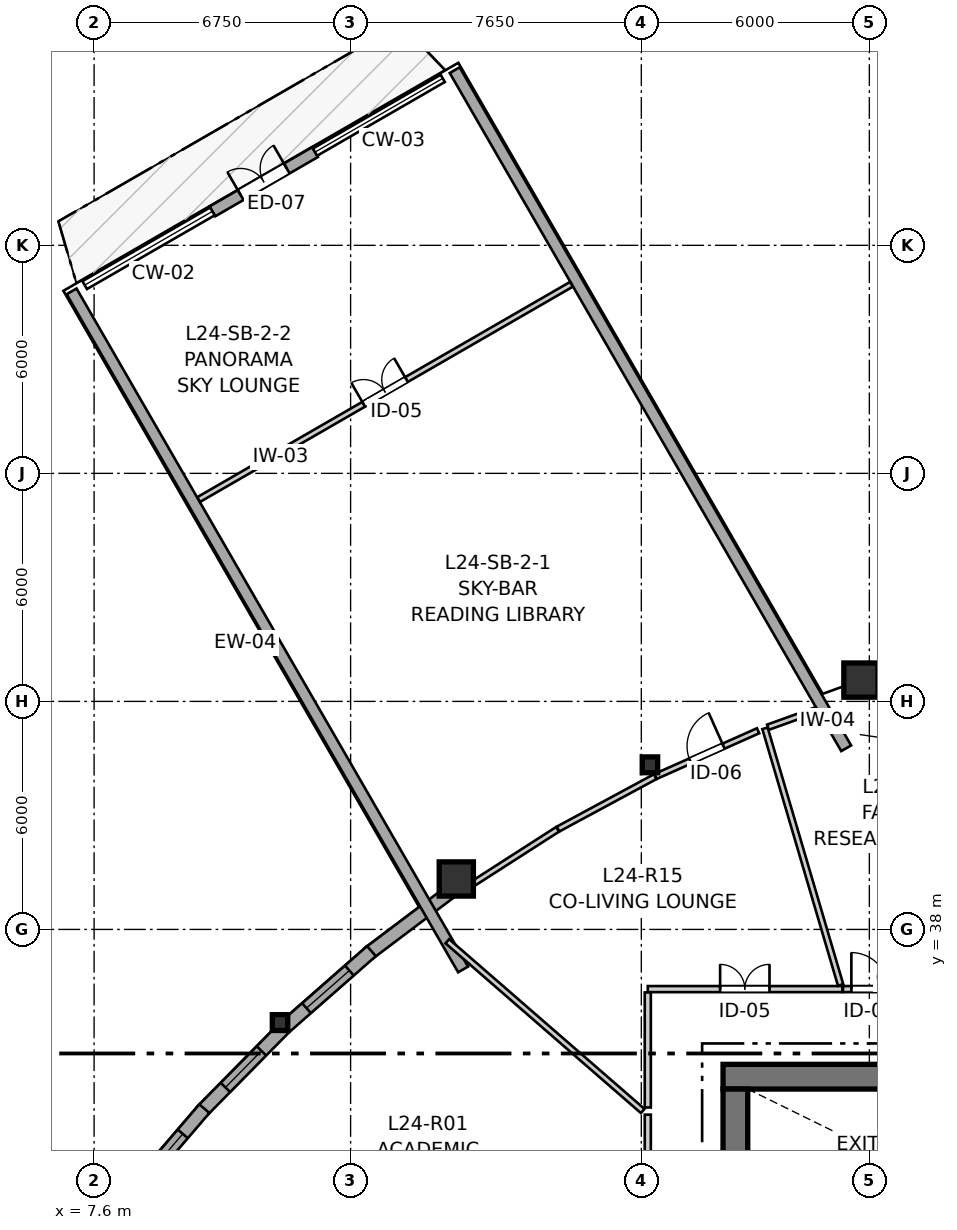
"""IFC4 building model, lengths in metres.
Left out: names, types, materials, properties, quantities, classifications, styles, units other than length and angle.
Written with IfcOpenShell. Run it as: python <this file> out.ifc"""

import sys

from ifc_helpers import new_model, si_unit, direction, frame, frame_2d, origin, origin_2d, place, context, subcontext, project, spatial, rectangle, i_section, extrude, source, transform, mapped, element, fill, save


model = new_model("IFC4")
c1 = context("Model", 3, precision=1e-05, world=origin(), true_north=direction((0.0, 1.0)))
c2 = subcontext(c1, "Body", "Model", "MODEL_VIEW")
j1 = project(units=[si_unit("LENGTHUNIT", "METRE"), si_unit("PLANEANGLEUNIT", "RADIAN")], contexts=[c1])
p1 = place(None, origin())
s1 = spatial("IfcSite", under=j1, at=p1, CompositionType="ELEMENT")
p2 = place(p1, origin())
s2 = spatial("IfcBuilding", under=s1, at=p2, CompositionType="ELEMENT")
p3 = place(p2, frame((0.0, 0.0, 83.2)))
s3 = spatial("IfcBuildingStorey", under=s2, at=p3, CompositionType="ELEMENT", Elevation=83.2)
p4 = place(p3, frame((36.55, 34.125, 0.0), z_axis=(0.0, 0.0, 1.0), x_axis=(-1.0, 0.0, 0.0)))
e1 = element("IfcWall", 1, at=p4, inside=s3, PredefinedType="SHEAR", context=c2, shape_type="SweptSolid", body=[
    extrude(rectangle(XDim=12.4, YDim=0.65, at=frame_2d((6.2, 0.0))), origin(), (0.0, 0.0, 1.0), 2.935),
])
p5 = place(p3, frame((24.475, 33.8, 0.0), z_axis=(0.0, 0.0, 1.0), x_axis=(0.0, -1.0, 0.0)))
e2 = element("IfcWall", 2, at=p5, inside=s3, PredefinedType="SHEAR", context=c2, shape_type="SweptSolid", body=[
    extrude(rectangle(XDim=15.6, YDim=0.65, at=frame_2d((7.8, 0.0))), origin(), (0.0, 0.0, 1.0), 2.935),
])
p6 = place(p5, frame((7.05, 0.0, 0.0)))
e3 = element("IfcOpeningElement", 3, at=p6, cuts=e2, PredefinedType="OPENING", context=c2, shape_type="SweptSolid", body=[
    extrude(rectangle(XDim=1.5, YDim=2.15, at=frame_2d((0.75, 1.075))), frame((0.0, 0.335, 0.0), z_axis=(0.0, -1.0, 0.0), x_axis=(1.0, 0.0, 0.0)), (0.0, 0.0, 1.0), 0.67),
])
p7 = place(p5, frame((3.52, 0.0, 0.0)))
e4 = element("IfcOpeningElement", 4, at=p7, cuts=e2, PredefinedType="OPENING", context=c2, shape_type="SweptSolid", body=[
    extrude(rectangle(XDim=0.86, YDim=2.05, at=frame_2d((0.43, 1.025))), frame((0.0, 0.335, 0.0), z_axis=(0.0, -1.0, 0.0), x_axis=(1.0, 0.0, 0.0)), (0.0, 0.0, 1.0), 0.67),
])
p8 = place(p5, frame((11.22, 0.0, 0.0)))
e5 = element("IfcOpeningElement", 5, at=p8, cuts=e2, PredefinedType="OPENING", context=c2, shape_type="SweptSolid", body=[
    extrude(rectangle(XDim=0.86, YDim=2.05, at=frame_2d((0.43, 1.025))), frame((0.0, 0.335, 0.0), z_axis=(0.0, -1.0, 0.0), x_axis=(1.0, 0.0, 0.0)), (0.0, 0.0, 1.0), 0.67),
])
m1 = source(origin(), c2, "Body", "SweptSolid", [
    extrude(rectangle(XDim=0.9, YDim=0.9, at=origin_2d()), origin(), (0.0, 0.0, 1.0), 2.935),
])
p9 = place(p3, frame((27.779, 44.561, 0.0), z_axis=(0.0, 0.0, 1.0), x_axis=(1.0, 0.0, 0.0)))
e6 = element("IfcColumn", 6, at=p9, inside=s3, PredefinedType="COLUMN", context=c2, shape_type="MappedRepresentation", body=[
    mapped(m1, transform((0.0, 0.0, 0.0), x_axis=(1.0, 0.0, 0.0), y_axis=(0.0, 1.0, 0.0), z_axis=(0.0, 0.0, 1.0), scale=1.0)),
])
m2 = source(origin(), c2, "Body", "SweptSolid", [
    extrude(i_section(OverallWidth=0.406, OverallDepth=0.416, WebThickness=0.027, FlangeThickness=0.044, FilletRadius=0.015, at=origin_2d()), origin(), (0.0, 0.0, 1.0), 2.935),
])
p10 = place(p3, frame((22.227, 42.331, 0.0), z_axis=(0.0, 0.0, 1.0), x_axis=(1.0, 0.0, 0.0)))
e7 = element("IfcColumn", 7, at=p10, inside=s3, PredefinedType="PILASTER", context=c2, shape_type="MappedRepresentation", body=[
    mapped(m2, transform((0.0, 0.0, 0.0), x_axis=(1.0, 0.0, 0.0), y_axis=(0.0, 1.0, 0.0), z_axis=(0.0, 0.0, 1.0), scale=1.0)),
])
p11 = place(p3, frame((17.131, 39.327, 0.0), z_axis=(0.0, 0.0, 1.0), x_axis=(1.0, 0.0, 0.0)))
e8 = element("IfcColumn", 8, at=p11, inside=s3, PredefinedType="COLUMN", context=c2, shape_type="MappedRepresentation", body=[
    mapped(m1, transform((0.0, 0.0, 0.0), x_axis=(1.0, 0.0, 0.0), y_axis=(0.0, 1.0, 0.0), z_axis=(0.0, 0.0, 1.0), scale=1.0)),
])
p12 = place(p3, frame((12.493, 35.549, 0.0), z_axis=(0.0, 0.0, 1.0), x_axis=(1.0, 0.0, 0.0)))
e9 = element("IfcColumn", 9, at=p12, inside=s3, PredefinedType="PILASTER", context=c2, shape_type="MappedRepresentation", body=[
    mapped(m2, transform((0.0, 0.0, 0.0), x_axis=(1.0, 0.0, 0.0), y_axis=(0.0, 1.0, 0.0), z_axis=(0.0, 0.0, 1.0), scale=1.0)),
])
p13 = place(p3, frame((30.809, 45.227, 0.0), z_axis=(0.0, 0.0, 1.0), x_axis=(-0.963041637143, -0.269352566591, 0.0)))
e10 = element("IfcWall", 10, at=p13, inside=s3, PredefinedType="SOLIDWALL", context=c2, shape_type="SweptSolid", body=[
    extrude(rectangle(XDim=2.873, YDim=0.35, at=frame_2d((1.437, 0.0))), origin(), (0.0, 0.0, 1.0), 2.465),
])
p14 = place(p13, frame((0.717, 0.0, 0.82)))
e11 = element("IfcOpeningElement", 11, at=p14, cuts=e10, PredefinedType="OPENING", context=c2, shape_type="SweptSolid", body=[
    extrude(rectangle(XDim=1.45, YDim=1.25, at=frame_2d((0.725, 0.625))), frame((0.0, 0.185, 0.0), z_axis=(0.0, -1.0, 0.0), x_axis=(1.0, 0.0, 0.0)), (0.0, 0.0, 1.0), 0.37),
])
p15 = place(p3, frame((17.057, 39.052, 0.0), z_axis=(0.0, 0.0, 1.0), x_axis=(-0.798379678642, -0.602154372841, 0.0)))
e12 = element("IfcWall", 12, at=p15, inside=s3, PredefinedType="SOLIDWALL", context=c2, shape_type="SweptSolid", body=[
    extrude(rectangle(XDim=2.79, YDim=0.35, at=frame_2d((1.395, 0.0))), origin(), (0.0, 0.0, 1.0), 2.465),
])
p16 = place(p3, frame((14.899, 37.429, 0.0), z_axis=(0.0, 0.0, 1.0), x_axis=(-0.751526984469, -0.659702350773, 0.0)))
e13 = element("IfcWall", 13, at=p16, inside=s3, PredefinedType="SOLIDWALL", context=c2, shape_type="SweptSolid", body=[
    extrude(rectangle(XDim=3.028, YDim=0.35, at=frame_2d((1.514, 0.0))), origin(), (0.0, 0.0, 1.0), 2.465),
])
p17 = place(p16, frame((0.774, 0.0, 0.82)))
e14 = element("IfcOpeningElement", 14, at=p17, cuts=e13, PredefinedType="OPENING", context=c2, shape_type="SweptSolid", body=[
    extrude(rectangle(XDim=1.5, YDim=1.45, at=frame_2d((0.75, 0.725))), frame((0.0, 0.185, 0.0), z_axis=(0.0, -1.0, 0.0), x_axis=(1.0, 0.0, 0.0)), (0.0, 0.0, 1.0), 0.37),
])
p18 = place(p3, frame((12.603, 35.412, 0.0), z_axis=(0.0, 0.0, 1.0), x_axis=(-0.701972782373, -0.71220377197, 0.0)))
e15 = element("IfcWall", 15, at=p18, inside=s3, PredefinedType="SOLIDWALL", context=c2, shape_type="SweptSolid", body=[
    extrude(rectangle(XDim=3.078, YDim=0.35, at=frame_2d((1.539, 0.0))), origin(), (0.0, 0.0, 1.0), 2.465),
])
p19 = place(p18, frame((0.854, 0.0, 0.82)))
e16 = element("IfcOpeningElement", 16, at=p19, cuts=e15, PredefinedType="OPENING", context=c2, shape_type="SweptSolid", body=[
    extrude(rectangle(XDim=1.35, YDim=1.45, at=frame_2d((0.675, 0.725))), frame((0.0, 0.185, 0.0), z_axis=(0.0, -1.0, 0.0), x_axis=(1.0, 0.0, 0.0)), (0.0, 0.0, 1.0), 0.37),
])
p20 = place(p3, frame((10.502, 33.285, 0.0), z_axis=(0.0, 0.0, 1.0), x_axis=(-0.650770847407, -0.75927419564, 0.0)))
e17 = element("IfcWall", 17, at=p20, inside=s3, PredefinedType="SOLIDWALL", context=c2, shape_type="SweptSolid", body=[
    extrude(rectangle(XDim=2.938, YDim=0.35, at=frame_2d((1.469, 0.0))), origin(), (0.0, 0.0, 1.0), 2.465),
])
p21 = place(p20, frame((0.874, 0.0, 0.82)))
e18 = element("IfcOpeningElement", 18, at=p21, cuts=e17, PredefinedType="OPENING", context=c2, shape_type="SweptSolid", body=[
    extrude(rectangle(XDim=1.2, YDim=1.45, at=frame_2d((0.6, 0.725))), frame((0.0, 0.185, 0.0), z_axis=(0.0, -1.0, 0.0), x_axis=(1.0, 0.0, 0.0)), (0.0, 0.0, 1.0), 0.37),
])
for number, where, z_axis, x_axis in (
    (19, (17.31, 36.946, 0.0), (0.0, 0.0, 1.0), (-0.5, 0.866, 0.0)),
    (20, (27.39, 42.766, 0.0), (0.0, 0.0, 1.0), (-0.5, 0.866, 0.0)),
):
    element("IfcWall", number, at=place(p3, frame(where, z_axis=z_axis, x_axis=x_axis)), inside=s3, PredefinedType="SOLIDWALL", context=c2, shape_type="SweptSolid", body=[
        extrude(rectangle(XDim=20.603, YDim=0.3, at=frame_2d((10.302, 0.0))), origin(), (0.0, 0.0, 1.0), 2.115),
    ])
p22 = place(p3, frame((10.712, 56.893, 0.0), z_axis=(0.0, 0.0, 1.0), x_axis=(0.866029224906, 0.499993381564, 0.0)))
e21 = element("IfcWall", 21, at=p22, inside=s3, PredefinedType="SOLIDWALL", context=c2, shape_type="SweptSolid", body=[
    extrude(rectangle(XDim=3.12, YDim=0.3, at=frame_2d((1.56, 0.0))), origin(), (0.0, 0.0, 1.0), 2.3),
])
p23 = place(p22, frame((0.86, 0.0, 0.0)))
e22 = element("IfcOpeningElement", 22, at=p23, cuts=e21, PredefinedType="OPENING", context=c2, shape_type="SweptSolid", body=[
    extrude(rectangle(XDim=1.4, YDim=2.15, at=frame_2d((0.7, 1.075))), frame((0.0, 0.16, 0.0), z_axis=(0.0, -1.0, 0.0), x_axis=(1.0, 0.0, 0.0)), (0.0, 0.0, 1.0), 0.32),
])
p24 = place(p3, frame((10.353, 49.312, 0.0), z_axis=(0.0, 0.0, 1.0), x_axis=(0.866036235619, 0.499981238243, 0.0)))
e23 = element("IfcWall", 23, at=p24, inside=s3, PredefinedType="PARTITIONING", context=c2, shape_type="SweptSolid", body=[
    extrude(rectangle(XDim=11.324, YDim=0.145, at=frame_2d((5.662, 0.0))), origin(), (0.0, 0.0, 1.0), 2.353),
])
p25 = place(p24, frame((5.012, 0.0, 0.0)))
e24 = element("IfcOpeningElement", 24, at=p25, cuts=e23, PredefinedType="OPENING", context=c2, shape_type="SweptSolid", body=[
    extrude(rectangle(XDim=1.3, YDim=2.1, at=frame_2d((0.65, 1.05))), frame((0.0, 0.083, 0.0), z_axis=(0.0, -1.0, 0.0), x_axis=(1.0, 0.0, 0.0)), (0.0, 0.0, 1.0), 0.165),
])
p26 = place(p3, frame((22.17, 27.85, 0.0), z_axis=(0.0, 0.0, 1.0), x_axis=(0.0, 1.0, 0.0)))
e25 = element("IfcWall", 25, at=p26, inside=s3, PredefinedType="PARTITIONING", context=c2, shape_type="SweptSolid", body=[
    extrude(rectangle(XDim=5.276, YDim=0.16, at=frame_2d((2.638, 0.0))), origin(), (0.0, 0.0, 1.0), 2.935),
])
p27 = place(p26, frame((2.689, 0.0, 0.0)))
e26 = element("IfcOpeningElement", 26, at=p27, cuts=e25, PredefinedType="OPENING", context=c2, shape_type="SweptSolid", body=[
    extrude(rectangle(XDim=1.3, YDim=2.1, at=frame_2d((0.65, 1.05))), frame((0.0, 0.09, 0.0), z_axis=(0.0, -1.0, 0.0), x_axis=(1.0, 0.0, 0.0)), (0.0, 0.0, 1.0), 0.18),
])
p28 = place(p3, frame((22.17, 36.43, 0.0), z_axis=(0.0, 0.0, 1.0), x_axis=(1.0, 0.0, 0.0)))
e27 = element("IfcWall", 27, at=p28, inside=s3, PredefinedType="PARTITIONING", context=c2, shape_type="SweptSolid", body=[
    extrude(rectangle(XDim=5.122, YDim=0.16, at=frame_2d((2.561, 0.0))), origin(), (0.0, 0.0, 1.0), 2.573),
])
p29 = place(p28, frame((1.903, 0.0, 0.0)))
e28 = element("IfcOpeningElement", 28, at=p29, cuts=e27, PredefinedType="OPENING", context=c2, shape_type="SweptSolid", body=[
    extrude(rectangle(XDim=1.3, YDim=2.1, at=frame_2d((0.65, 1.05))), frame((0.0, 0.09, 0.0), z_axis=(0.0, -1.0, 0.0), x_axis=(1.0, 0.0, 0.0)), (0.0, 0.0, 1.0), 0.18),
])
p30 = place(p3, frame((27.307, 36.43, 0.0), z_axis=(0.0, 0.0, 1.0), x_axis=(1.0, 0.0, 0.0)))
e29 = element("IfcWall", 29, at=p30, inside=s3, PredefinedType="PARTITIONING", context=c2, shape_type="SweptSolid", body=[
    extrude(rectangle(XDim=4.013, YDim=0.16, at=frame_2d((2.007, 0.0))), origin(), (0.0, 0.0, 1.0), 2.935),
])
p31 = place(p30, frame((0.22, 0.0, 0.0)))
e30 = element("IfcOpeningElement", 30, at=p31, cuts=e29, PredefinedType="OPENING", context=c2, shape_type="SweptSolid", body=[
    extrude(rectangle(XDim=0.96, YDim=2.1, at=frame_2d((0.48, 1.05))), frame((0.0, 0.09, 0.0), z_axis=(0.0, -1.0, 0.0), x_axis=(1.0, 0.0, 0.0)), (0.0, 0.0, 1.0), 0.18),
])
p32 = place(p3, frame((22.377, 42.026, 0.0), z_axis=(0.0, 0.0, 1.0), x_axis=(0.913387960111, 0.407090204162, 0.0)))
e31 = element("IfcWall", 31, at=p32, inside=s3, PredefinedType="PARTITIONING", context=c2, shape_type="SweptSolid", body=[
    extrude(rectangle(XDim=2.951, YDim=0.145, at=frame_2d((1.475, 0.0))), origin(), (0.0, 0.0, 1.0), 2.453),
])
p33 = place(p32, frame((0.995, 0.0, 0.0)))
e32 = element("IfcOpeningElement", 32, at=p33, cuts=e31, PredefinedType="OPENING", context=c2, shape_type="SweptSolid", body=[
    extrude(rectangle(XDim=0.96, YDim=2.1, at=frame_2d((0.48, 1.05))), frame((0.0, 0.083, 0.0), z_axis=(0.0, -1.0, 0.0), x_axis=(1.0, 0.0, 0.0)), (0.0, 0.0, 1.0), 0.165),
])
p34 = place(p3, frame((16.895, 37.69, 0.0), z_axis=(0.0, 0.0, 1.0), x_axis=(0.754854710059, -0.655892038907, 0.0)))
e33 = element("IfcWall", 33, at=p34, inside=s3, PredefinedType="PARTITIONING", context=c2, shape_type="SweptSolid", body=[
    extrude(rectangle(XDim=6.811, YDim=0.145, at=frame_2d((3.406, 0.0))), origin(), (0.0, 0.0, 1.0), 2.103),
])
p35 = place(p3, frame((25.254, 43.292, 0.0), z_axis=(0.0, 0.0, 1.0), x_axis=(0.282661880608, -0.959219610543, 0.0)))
e34 = element("IfcWall", 34, at=p35, inside=s3, PredefinedType="PARTITIONING", context=c2, shape_type="SweptSolid", body=[
    extrude(rectangle(XDim=7.041, YDim=0.145, at=frame_2d((3.521, 0.0))), origin(), (0.0, 0.0, 1.0), 2.935),
])
p36 = place(p3, frame((22.17, 33.315, 0.0), z_axis=(0.0, 0.0, 1.0), x_axis=(0.0, 1.0, 0.0)))
e35 = element("IfcWall", 35, at=p36, inside=s3, PredefinedType="PARTITIONING", context=c2, shape_type="SweptSolid", body=[
    extrude(rectangle(XDim=3.027, YDim=0.16, at=frame_2d((1.514, 0.0))), origin(), (0.0, 0.0, 1.0), 2.935),
])
p37 = place(p3, frame((17.326, 39.048, 0.0), z_axis=(0.0, 0.0, 1.0), x_axis=(0.841527071554, 0.540214945963, 0.0)))
e36 = element("IfcWall", 36, at=p37, inside=s3, PredefinedType="PARTITIONING", context=c2, shape_type="SweptSolid", body=[
    extrude(rectangle(XDim=2.934, YDim=0.145, at=frame_2d((1.467, 0.0))), origin(), (0.0, 0.0, 1.0), 2.453),
])
p38 = place(p3, frame((19.808, 40.64, 0.0), z_axis=(0.0, 0.0, 1.0), x_axis=(0.880106382364, 0.474776532404, 0.0)))
e37 = element("IfcWall", 37, at=p38, inside=s3, PredefinedType="PARTITIONING", context=c2, shape_type="SweptSolid", body=[
    extrude(rectangle(XDim=2.904, YDim=0.145, at=frame_2d((1.452, 0.0))), origin(), (0.0, 0.0, 1.0), 2.453),
])
p39 = place(p3, frame((25.334, 43.321, 0.0), z_axis=(0.0, 0.0, 1.0), x_axis=(0.940956330278, 0.3385279671, 0.0)))
e38 = element("IfcWall", 38, at=p39, inside=s3, PredefinedType="PARTITIONING", context=c2, shape_type="SweptSolid", body=[
    extrude(rectangle(XDim=1.354, YDim=0.145, at=frame_2d((0.677, 0.0))), origin(), (0.0, 0.0, 1.0), 2.453),
])
m3 = source(origin(), c2, "Body", "SweptSolid", [
    extrude(rectangle(XDim=1.5, YDim=1.45, at=frame_2d((0.75, 0.725))), frame((0.0, 0.03, 0.0), z_axis=(0.0, -1.0, 0.0), x_axis=(1.0, 0.0, 0.0)), (0.0, 0.0, 1.0), 0.06),
])
p40 = place(p17, origin())
e39 = element("IfcWindow", 39, at=p40, inside=s3, PartitioningType="SINGLE_PANEL", PredefinedType="WINDOW", context=c2, shape_type="MappedRepresentation", body=[
    mapped(m3, transform((0.0, 0.0, 0.0), x_axis=(1.0, 0.0, 0.0), y_axis=(0.0, 1.0, 0.0), z_axis=(0.0, 0.0, 1.0), scale=1.0)),
])
fill(e14, e39)
m4 = source(origin(), c2, "Body", "SweptSolid", [
    extrude(rectangle(XDim=1.35, YDim=1.45, at=frame_2d((0.675, 0.725))), frame((0.0, 0.03, 0.0), z_axis=(0.0, -1.0, 0.0), x_axis=(1.0, 0.0, 0.0)), (0.0, 0.0, 1.0), 0.06),
])
p41 = place(p19, origin())
e40 = element("IfcWindow", 40, at=p41, inside=s3, PartitioningType="SINGLE_PANEL", PredefinedType="WINDOW", context=c2, shape_type="MappedRepresentation", body=[
    mapped(m4, transform((0.0, 0.0, 0.0), x_axis=(1.0, 0.0, 0.0), y_axis=(0.0, 1.0, 0.0), z_axis=(0.0, 0.0, 1.0), scale=1.0)),
])
fill(e16, e40)
m5 = source(origin(), c2, "Body", "SweptSolid", [
    extrude(rectangle(XDim=1.2, YDim=1.45, at=frame_2d((0.6, 0.725))), frame((0.0, 0.03, 0.0), z_axis=(0.0, -1.0, 0.0), x_axis=(1.0, 0.0, 0.0)), (0.0, 0.0, 1.0), 0.06),
])
p42 = place(p21, origin())
e41 = element("IfcWindow", 41, at=p42, inside=s3, PartitioningType="SINGLE_PANEL", PredefinedType="WINDOW", context=c2, shape_type="MappedRepresentation", body=[
    mapped(m5, transform((0.0, 0.0, 0.0), x_axis=(1.0, 0.0, 0.0), y_axis=(0.0, 1.0, 0.0), z_axis=(0.0, 0.0, 1.0), scale=1.0)),
])
fill(e18, e41)
m6 = source(origin(), c2, "Body", "SweptSolid", [
    extrude(rectangle(XDim=1.4, YDim=2.15, at=frame_2d((0.7, 1.075))), frame((0.0, 0.025, 0.0), z_axis=(0.0, -1.0, 0.0), x_axis=(1.0, 0.0, 0.0)), (0.0, 0.0, 1.0), 0.05),
])
p43 = place(p23, origin())
e42 = element("IfcDoor", 42, at=p43, inside=s3, OperationType="DOUBLE_DOOR_SINGLE_SWING", PredefinedType="DOOR", context=c2, shape_type="MappedRepresentation", body=[
    mapped(m6, transform((0.0, 0.0, 0.0), x_axis=(1.0, 0.0, 0.0), y_axis=(0.0, 1.0, 0.0), z_axis=(0.0, 0.0, 1.0), scale=1.0)),
])
fill(e22, e42)
m7 = source(origin(), c2, "Body", "SweptSolid", [
    extrude(rectangle(XDim=1.3, YDim=2.1, at=frame_2d((0.65, 1.05))), frame((0.0, 0.025, 0.0), z_axis=(0.0, -1.0, 0.0), x_axis=(1.0, 0.0, 0.0)), (0.0, 0.0, 1.0), 0.05),
])
p44 = place(p25, origin())
e43 = element("IfcDoor", 43, at=p44, inside=s3, OperationType="DOUBLE_DOOR_SINGLE_SWING", PredefinedType="DOOR", context=c2, shape_type="MappedRepresentation", body=[
    mapped(m7, transform((0.0, 0.0, 0.0), x_axis=(1.0, 0.0, 0.0), y_axis=(0.0, 1.0, 0.0), z_axis=(0.0, 0.0, 1.0), scale=1.0)),
])
fill(e24, e43)
p45 = place(p29, origin())
e44 = element("IfcDoor", 44, at=p45, inside=s3, OperationType="DOUBLE_DOOR_SINGLE_SWING", PredefinedType="DOOR", context=c2, shape_type="MappedRepresentation", body=[
    mapped(m7, transform((0.0, 0.0, 0.0), x_axis=(1.0, 0.0, 0.0), y_axis=(0.0, 1.0, 0.0), z_axis=(0.0, 0.0, 1.0), scale=1.0)),
])
fill(e28, e44)
m8 = source(origin(), c2, "Body", "SweptSolid", [
    extrude(rectangle(XDim=0.96, YDim=2.1, at=frame_2d((0.48, 1.05))), frame((0.0, 0.025, 0.0), z_axis=(0.0, -1.0, 0.0), x_axis=(1.0, 0.0, 0.0)), (0.0, 0.0, 1.0), 0.05),
])
p46 = place(p31, origin())
e45 = element("IfcDoor", 45, at=p46, inside=s3, OperationType="SINGLE_SWING_LEFT", PredefinedType="DOOR", context=c2, shape_type="MappedRepresentation", body=[
    mapped(m8, transform((0.0, 0.0, 0.0), x_axis=(1.0, 0.0, 0.0), y_axis=(0.0, 1.0, 0.0), z_axis=(0.0, 0.0, 1.0), scale=1.0)),
])
fill(e30, e45)
p47 = place(p33, origin())
e46 = element("IfcDoor", 46, at=p47, inside=s3, OperationType="SINGLE_SWING_RIGHT", PredefinedType="DOOR", context=c2, shape_type="MappedRepresentation", body=[
    mapped(m8, transform((0.0, 0.0, 0.0), x_axis=(1.0, 0.0, 0.0), y_axis=(0.0, 1.0, 0.0), z_axis=(0.0, 0.0, 1.0), scale=1.0)),
])
fill(e32, e46)
save(model, sys.argv[1])
